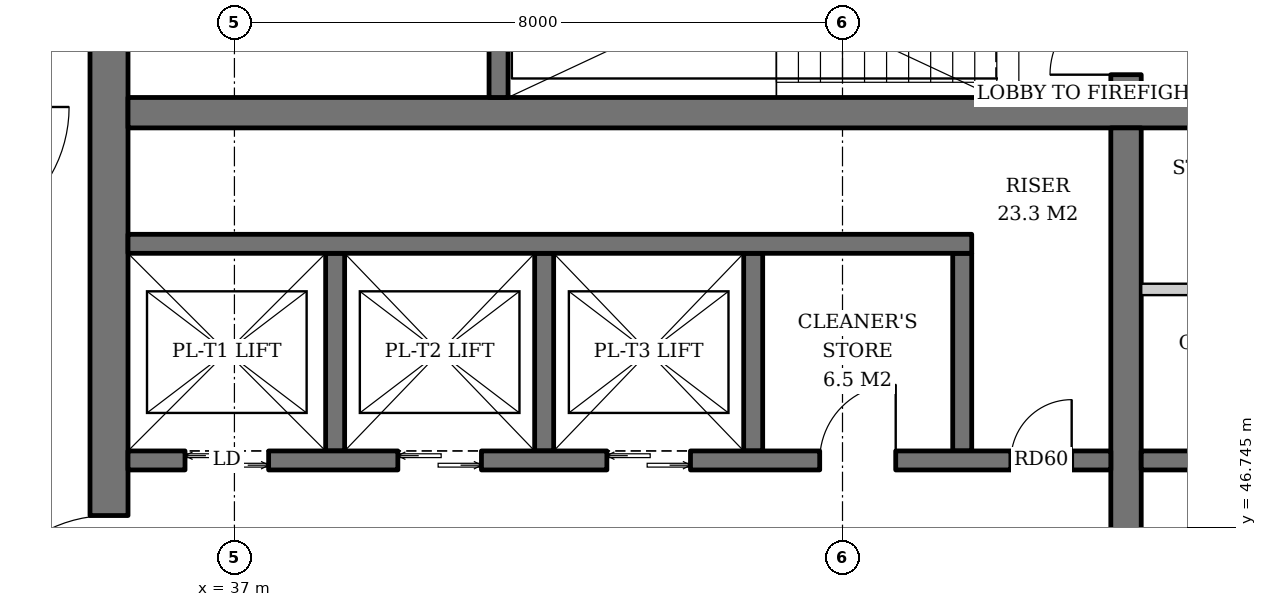
"""IFC4 building model, lengths in metres.
Left out: names, types, materials, properties, quantities, classifications, styles, units other than length and angle.
Written with IfcOpenShell. Run it as: python <this file> out.ifc"""

import sys

from ifc_helpers import new_model, si_unit, direction, frame, frame_2d, origin, place, context, subcontext, project, spatial, rectangle, extrude, element, fill, save


model = new_model("IFC4")
c1 = context("Model", 3, precision=1e-05, world=origin(), true_north=direction((0.0, 1.0)))
c2 = subcontext(c1, "Body", "Model", "MODEL_VIEW")
j1 = project(units=[si_unit("LENGTHUNIT", "METRE"), si_unit("PLANEANGLEUNIT", "RADIAN")], contexts=[c1])
p1 = place(None, origin())
s1 = spatial("IfcSite", under=j1, at=p1, CompositionType="ELEMENT")
p2 = place(p1, origin())
s2 = spatial("IfcBuilding", under=s1, at=p2, CompositionType="ELEMENT")
p3 = place(p2, frame((0.0, 0.0, 283.2)))
s3 = spatial("IfcBuildingStorey", under=s2, at=p3, CompositionType="ELEMENT", Elevation=283.2)
p4 = place(p3, frame((35.35, 36.6, 0.0), z_axis=(0.0, 0.0, 1.0), x_axis=(0.0, 1.0, 0.0)))
e1 = element("IfcWall", 1, at=p4, inside=s3, PredefinedType="SHEAR", context=c2, shape_type="SweptSolid", body=[
    extrude(rectangle(XDim=18.8, YDim=0.5, at=frame_2d((9.4, 0.0))), origin(), (0.0, 0.0, 1.0), 3.8),
])
p5 = place(p4, frame((8.5, 0.0, 0.0)))
e2 = element("IfcOpeningElement", 2, at=p5, cuts=e1, PredefinedType="OPENING", context=c2, shape_type="SweptSolid", body=[
    extrude(rectangle(XDim=1.8, YDim=2.4, at=frame_2d((0.9, 1.2))), frame((0.0, 0.26, 0.0), z_axis=(0.0, -1.0, 0.0), x_axis=(1.0, 0.0, 0.0)), (0.0, 0.0, 1.0), 0.52),
])
p6 = place(p3, frame((35.6, 52.2, 0.0), z_axis=(0.0, 0.0, 1.0), x_axis=(1.0, 0.0, 0.0)))
e3 = element("IfcWall", 3, at=p6, inside=s3, PredefinedType="SHEAR", context=c2, shape_type="SweptSolid", body=[
    extrude(rectangle(XDim=18.8, YDim=0.4, at=frame_2d((9.4, 0.0))), origin(), (0.0, 0.0, 1.0), 3.8),
])
p7 = place(p3, frame((48.73, 40.0, 0.0), z_axis=(0.0, 0.0, 1.0), x_axis=(0.0, 1.0, 0.0)))
e4 = element("IfcWall", 4, at=p7, inside=s3, PredefinedType="SHEAR", context=c2, shape_type="SweptSolid", body=[
    extrude(rectangle(XDim=12.0, YDim=0.4, at=frame_2d((6.0, 0.0))), origin(), (0.0, 0.0, 1.0), 3.8),
])
p8 = place(p3, frame((48.73, 52.4, 0.0), z_axis=(0.0, 0.0, 1.0), x_axis=(0.0, 1.0, 0.0)))
e5 = element("IfcWall", 5, at=p8, inside=s3, PredefinedType="SHEAR", context=c2, shape_type="SweptSolid", body=[
    extrude(rectangle(XDim=3.0, YDim=0.4, at=frame_2d((1.5, 0.0))), origin(), (0.0, 0.0, 1.0), 3.8),
])
p9 = place(p8, frame((0.3, 0.0, 0.0)))
e6 = element("IfcOpeningElement", 6, at=p9, cuts=e5, PredefinedType="OPENING", context=c2, shape_type="SweptSolid", body=[
    extrude(rectangle(XDim=1.0, YDim=2.1, at=frame_2d((0.5, 1.05))), frame((0.0, 0.21, 0.0), z_axis=(0.0, -1.0, 0.0), x_axis=(1.0, 0.0, 0.0)), (0.0, 0.0, 1.0), 0.42),
])
p10 = place(p3, frame((40.475, 52.4, 0.0), z_axis=(0.0, 0.0, 1.0), x_axis=(0.0, 1.0, 0.0)))
e7 = element("IfcWall", 7, at=p10, inside=s3, PredefinedType="SHEAR", context=c2, shape_type="SweptSolid", body=[
    extrude(rectangle(XDim=3.0, YDim=0.25, at=frame_2d((1.5, 0.0))), origin(), (0.0, 0.0, 1.0), 3.8),
])
for number, where, z_axis, x_axis in (
    (8, (38.325, 47.75, 0.0), (0.0, 0.0, 1.0), (0.0, 1.0, 0.0)),
    (9, (41.075, 47.75, 0.0), (0.0, 0.0, 1.0), (0.0, 1.0, 0.0)),
    (10, (43.825, 47.75, 0.0), (0.0, 0.0, 1.0), (0.0, 1.0, 0.0)),
    (11, (46.575, 47.75, 0.0), (0.0, 0.0, 1.0), (0.0, 1.0, 0.0)),
):
    element("IfcWall", number, at=place(p3, frame(where, z_axis=z_axis, x_axis=x_axis)), inside=s3, PredefinedType="SHEAR", context=c2, shape_type="SweptSolid", body=[
        extrude(rectangle(XDim=2.6, YDim=0.25, at=frame_2d((1.3, 0.0))), origin(), (0.0, 0.0, 1.0), 3.8),
    ])
p11 = place(p3, frame((35.6, 50.475, 0.0), z_axis=(0.0, 0.0, 1.0), x_axis=(1.0, 0.0, 0.0)))
e12 = element("IfcWall", 12, at=p11, inside=s3, PredefinedType="SHEAR", context=c2, shape_type="SweptSolid", body=[
    extrude(rectangle(XDim=11.1, YDim=0.25, at=frame_2d((5.55, 0.0))), origin(), (0.0, 0.0, 1.0), 3.8),
])
p12 = place(p3, frame((35.6, 47.625, 0.0), z_axis=(0.0, 0.0, 1.0), x_axis=(1.0, 0.0, 0.0)))
e13 = element("IfcWall", 13, at=p12, inside=s3, PredefinedType="SHEAR", context=c2, shape_type="SweptSolid", body=[
    extrude(rectangle(XDim=12.93, YDim=0.25, at=frame_2d((6.465, 0.0))), origin(), (0.0, 0.0, 1.0), 3.8),
])
p13 = place(p12, frame((0.75, 0.0, 0.0)))
e14 = element("IfcOpeningElement", 14, at=p13, cuts=e13, PredefinedType="OPENING", context=c2, shape_type="SweptSolid", body=[
    extrude(rectangle(XDim=1.1, YDim=2.2, at=frame_2d((0.55, 1.1))), frame((0.0, 0.135, 0.0), z_axis=(0.0, -1.0, 0.0), x_axis=(1.0, 0.0, 0.0)), (0.0, 0.0, 1.0), 0.27),
])
p14 = place(p12, frame((3.55, 0.0, 0.0)))
e15 = element("IfcOpeningElement", 15, at=p14, cuts=e13, PredefinedType="OPENING", context=c2, shape_type="SweptSolid", body=[
    extrude(rectangle(XDim=1.1, YDim=2.2, at=frame_2d((0.55, 1.1))), frame((0.0, 0.135, 0.0), z_axis=(0.0, -1.0, 0.0), x_axis=(1.0, 0.0, 0.0)), (0.0, 0.0, 1.0), 0.27),
])
p15 = place(p12, frame((6.3, 0.0, 0.0)))
e16 = element("IfcOpeningElement", 16, at=p15, cuts=e13, PredefinedType="OPENING", context=c2, shape_type="SweptSolid", body=[
    extrude(rectangle(XDim=1.1, YDim=2.2, at=frame_2d((0.55, 1.1))), frame((0.0, 0.135, 0.0), z_axis=(0.0, -1.0, 0.0), x_axis=(1.0, 0.0, 0.0)), (0.0, 0.0, 1.0), 0.27),
])
p16 = place(p12, frame((9.1, 0.0, 0.0)))
e17 = element("IfcOpeningElement", 17, at=p16, cuts=e13, PredefinedType="OPENING", context=c2, shape_type="SweptSolid", body=[
    extrude(rectangle(XDim=1.0, YDim=2.1, at=frame_2d((0.5, 1.05))), frame((0.0, 0.135, 0.0), z_axis=(0.0, -1.0, 0.0), x_axis=(1.0, 0.0, 0.0)), (0.0, 0.0, 1.0), 0.27),
])
p17 = place(p12, frame((11.615, 0.0, 0.0)))
e18 = element("IfcOpeningElement", 18, at=p17, cuts=e13, PredefinedType="OPENING", context=c2, shape_type="SweptSolid", body=[
    extrude(rectangle(XDim=0.8, YDim=2.0, at=frame_2d((0.4, 1.0))), frame((0.0, 0.135, 0.0), z_axis=(0.0, -1.0, 0.0), x_axis=(1.0, 0.0, 0.0)), (0.0, 0.0, 1.0), 0.27),
])
p18 = place(p3, frame((48.93, 47.625, 0.0), z_axis=(0.0, 0.0, 1.0), x_axis=(1.0, 0.0, 0.0)))
e19 = element("IfcWall", 19, at=p18, inside=s3, PredefinedType="SHEAR", context=c2, shape_type="SweptSolid", body=[
    extrude(rectangle(XDim=5.47, YDim=0.25, at=frame_2d((2.735, 0.0))), origin(), (0.0, 0.0, 1.0), 3.8),
])
p19 = place(p18, frame((0.78, 0.0, 0.0)))
e20 = element("IfcOpeningElement", 20, at=p19, cuts=e19, PredefinedType="OPENING", context=c2, shape_type="SweptSolid", body=[
    extrude(rectangle(XDim=1.0, YDim=2.1, at=frame_2d((0.5, 1.05))), frame((0.0, 0.135, 0.0), z_axis=(0.0, -1.0, 0.0), x_axis=(1.0, 0.0, 0.0)), (0.0, 0.0, 1.0), 0.27),
])
p20 = place(p18, frame((3.64, 0.0, 0.0)))
e21 = element("IfcOpeningElement", 21, at=p20, cuts=e19, PredefinedType="OPENING", context=c2, shape_type="SweptSolid", body=[
    extrude(rectangle(XDim=1.0, YDim=2.1, at=frame_2d((0.5, 1.05))), frame((0.0, 0.135, 0.0), z_axis=(0.0, -1.0, 0.0), x_axis=(1.0, 0.0, 0.0)), (0.0, 0.0, 1.0), 0.27),
])
p21 = place(p3, frame((48.93, 49.875, 0.0), z_axis=(0.0, 0.0, 1.0), x_axis=(1.0, 0.0, 0.0)))
e22 = element("IfcWall", 22, at=p21, inside=s3, PredefinedType="SOLIDWALL", context=c2, shape_type="SweptSolid", body=[
    extrude(rectangle(XDim=2.56, YDim=0.15, at=frame_2d((1.28, 0.0))), origin(), (0.0, 0.0, 1.0), 3.6),
])
p22 = place(p21, frame((0.78, 0.0, 0.0)))
e23 = element("IfcOpeningElement", 23, at=p22, cuts=e22, PredefinedType="OPENING", context=c2, shape_type="SweptSolid", body=[
    extrude(rectangle(XDim=1.0, YDim=2.1, at=frame_2d((0.5, 1.05))), frame((0.0, 0.085, 0.0), z_axis=(0.0, -1.0, 0.0), x_axis=(1.0, 0.0, 0.0)), (0.0, 0.0, 1.0), 0.17),
])
p23 = place(p13, origin())
e24 = element("IfcDoor", 24, at=p23, inside=s3, OperationType="DOUBLE_DOOR_SLIDING", PredefinedType="DOOR", context=c2, shape_type="SweptSolid", body=[
    extrude(rectangle(XDim=1.1, YDim=2.2, at=frame_2d((0.55, 1.1))), frame((0.0, 0.025, 0.0), z_axis=(0.0, -1.0, 0.0), x_axis=(1.0, 0.0, 0.0)), (0.0, 0.0, 1.0), 0.05),
])
fill(e14, e24)
p24 = place(p14, origin())
e25 = element("IfcDoor", 25, at=p24, inside=s3, OperationType="DOUBLE_DOOR_SLIDING", PredefinedType="DOOR", context=c2, shape_type="SweptSolid", body=[
    extrude(rectangle(XDim=1.1, YDim=2.2, at=frame_2d((0.55, 1.1))), frame((0.0, 0.025, 0.0), z_axis=(0.0, -1.0, 0.0), x_axis=(1.0, 0.0, 0.0)), (0.0, 0.0, 1.0), 0.05),
])
fill(e15, e25)
p25 = place(p15, origin())
e26 = element("IfcDoor", 26, at=p25, inside=s3, OperationType="DOUBLE_DOOR_SLIDING", PredefinedType="DOOR", context=c2, shape_type="SweptSolid", body=[
    extrude(rectangle(XDim=1.1, YDim=2.2, at=frame_2d((0.55, 1.1))), frame((0.0, 0.025, 0.0), z_axis=(0.0, -1.0, 0.0), x_axis=(1.0, 0.0, 0.0)), (0.0, 0.0, 1.0), 0.05),
])
fill(e16, e26)
p26 = place(p16, origin())
e27 = element("IfcDoor", 27, at=p26, inside=s3, OperationType="SINGLE_SWING_RIGHT", PredefinedType="DOOR", context=c2, shape_type="SweptSolid", body=[
    extrude(rectangle(XDim=1.0, YDim=2.1, at=frame_2d((0.5, 1.05))), frame((0.0, 0.025, 0.0), z_axis=(0.0, -1.0, 0.0), x_axis=(1.0, 0.0, 0.0)), (0.0, 0.0, 1.0), 0.05),
])
fill(e17, e27)
p27 = place(p17, origin())
e28 = element("IfcDoor", 28, at=p27, inside=s3, OperationType="SINGLE_SWING_RIGHT", PredefinedType="DOOR", context=c2, shape_type="SweptSolid", body=[
    extrude(rectangle(XDim=0.8, YDim=2.0, at=frame_2d((0.4, 1.0))), frame((0.0, 0.025, 0.0), z_axis=(0.0, -1.0, 0.0), x_axis=(1.0, 0.0, 0.0)), (0.0, 0.0, 1.0), 0.05),
])
fill(e18, e28)
p28 = place(p9, origin())
e29 = element("IfcDoor", 29, at=p28, inside=s3, OperationType="SINGLE_SWING_LEFT", PredefinedType="DOOR", context=c2, shape_type="SweptSolid", body=[
    extrude(rectangle(XDim=1.0, YDim=2.1, at=frame_2d((0.5, 1.05))), frame((0.0, 0.025, 0.0), z_axis=(0.0, -1.0, 0.0), x_axis=(1.0, 0.0, 0.0)), (0.0, 0.0, 1.0), 0.05),
])
fill(e6, e29)
p29 = place(p5, origin())
e30 = element("IfcDoor", 30, at=p29, inside=s3, OperationType="DOUBLE_DOOR_SINGLE_SWING", PredefinedType="DOOR", context=c2, shape_type="SweptSolid", body=[
    extrude(rectangle(XDim=1.8, YDim=2.4, at=frame_2d((0.9, 1.2))), frame((0.0, 0.025, 0.0), z_axis=(0.0, -1.0, 0.0), x_axis=(1.0, 0.0, 0.0)), (0.0, 0.0, 1.0), 0.05),
])
fill(e2, e30)
save(model, sys.argv[1])
